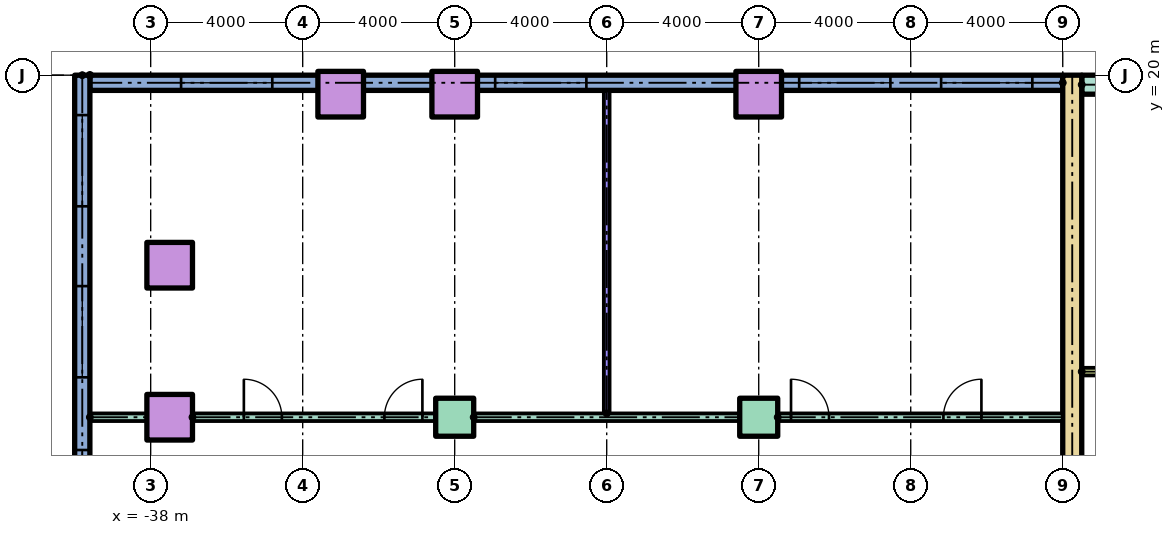
"""IFC4 building model, lengths in metres.
Left out: names, types, materials, properties, quantities, classifications, styles, units other than length and angle.
Written with IfcOpenShell. Run it as: python <this file> out.ifc"""

import sys

from ifc_helpers import new_model, si_unit, direction, frame, frame_2d, origin, origin_2d, place, context, subcontext, project, spatial, rectangle, hollow_rectangle, extrude, element, fill, save


model = new_model("IFC4")
c1 = context("Model", 3, precision=1e-05, world=origin(), true_north=direction((0.0, 1.0)))
c2 = subcontext(c1, "Body", "Model", "MODEL_VIEW")
j1 = project(units=[si_unit("LENGTHUNIT", "METRE"), si_unit("PLANEANGLEUNIT", "RADIAN")], contexts=[c1])
p1 = place(None, origin())
s1 = spatial("IfcSite", under=j1, at=p1, CompositionType="ELEMENT")
p2 = place(p1, origin())
s2 = spatial("IfcBuilding", under=s1, at=p2, CompositionType="ELEMENT")
p3 = place(p2, frame((0.0, 0.0, 22.0)))
s3 = spatial("IfcBuildingStorey", under=s2, at=p3, CompositionType="ELEMENT", Elevation=22.0)
p4 = place(p3, frame((-37.5, 11.0, 0.0)))
e1 = element("IfcColumn", 1, at=p4, inside=s3, PredefinedType="COLUMN", context=c2, shape_type="SweptSolid", body=[
    extrude(hollow_rectangle(XDim=1.2, YDim=1.2, WallThickness=0.06, at=origin_2d()), origin(), (0.0, 0.0, 1.0), 4.0),
])
for number, where in (
    (2, (-30.0, 11.0, 0.0)),
    (3, (-22.0, 11.0, 0.0)),
):
    element("IfcColumn", number, at=place(p3, frame(where)), inside=s3, PredefinedType="COLUMN", context=c2, shape_type="SweptSolid", body=[
        extrude(rectangle(XDim=1.0, YDim=1.0, at=origin_2d()), origin(), (0.0, 0.0, 1.0), 4.0),
    ])
for number, where in (
    (4, (-37.5, 15.0, 0.0)),
    (5, (-33.0, 19.5, 0.0)),
    (6, (-30.0, 19.5, 0.0)),
    (7, (-22.0, 19.5, 0.0)),
):
    element("IfcColumn", number, at=place(p3, frame(where)), inside=s3, PredefinedType="COLUMN", context=c2, shape_type="SweptSolid", body=[
        extrude(hollow_rectangle(XDim=1.2, YDim=1.2, WallThickness=0.06, at=origin_2d()), origin(), (0.0, 0.0, 1.0), 4.0),
    ])
p5 = place(p3, frame((-14.0, 19.8, 0.0), z_axis=(0.0, 0.0, 1.0), x_axis=(-1.0, 0.0, 0.0)))
e8 = element("IfcWall", 8, at=p5, inside=s3, PredefinedType="STANDARD", context=c2, shape_type="SweptSolid", body=[
    extrude(rectangle(XDim=25.6, YDim=0.4, at=frame_2d((12.8, 0.0))), origin(), (0.0, 0.0, 1.0), 3.7),
])
p6 = place(p5, frame((0.8, 0.0, 0.9)))
e9 = element("IfcOpeningElement", 9, at=p6, cuts=e8, PredefinedType="OPENING", context=c2, shape_type="SweptSolid", body=[
    extrude(rectangle(XDim=2.4, YDim=2.1, at=frame_2d((1.2, 1.05))), frame((0.0, 0.21, 0.0), z_axis=(0.0, -1.0, 0.0), x_axis=(1.0, 0.0, 0.0)), (0.0, 0.0, 1.0), 0.42),
])
p7 = place(p5, frame((4.535, 0.0, 0.9)))
e10 = element("IfcOpeningElement", 10, at=p7, cuts=e8, PredefinedType="OPENING", context=c2, shape_type="SweptSolid", body=[
    extrude(rectangle(XDim=2.4, YDim=2.1, at=frame_2d((1.2, 1.05))), frame((0.0, 0.21, 0.0), z_axis=(0.0, -1.0, 0.0), x_axis=(1.0, 0.0, 0.0)), (0.0, 0.0, 1.0), 0.42),
])
p8 = place(p5, frame((12.535, 0.0, 0.9)))
e11 = element("IfcOpeningElement", 11, at=p8, cuts=e8, PredefinedType="OPENING", context=c2, shape_type="SweptSolid", body=[
    extrude(rectangle(XDim=2.4, YDim=2.1, at=frame_2d((1.2, 1.05))), frame((0.0, 0.21, 0.0), z_axis=(0.0, -1.0, 0.0), x_axis=(1.0, 0.0, 0.0)), (0.0, 0.0, 1.0), 0.42),
])
p9 = place(p5, frame((20.8, 0.0, 0.9)))
e12 = element("IfcOpeningElement", 12, at=p9, cuts=e8, PredefinedType="OPENING", context=c2, shape_type="SweptSolid", body=[
    extrude(rectangle(XDim=2.4, YDim=2.1, at=frame_2d((1.2, 1.05))), frame((0.0, 0.21, 0.0), z_axis=(0.0, -1.0, 0.0), x_axis=(1.0, 0.0, 0.0)), (0.0, 0.0, 1.0), 0.42),
])
p10 = place(p3, frame((-39.8, 20.0, 0.0), z_axis=(0.0, 0.0, 1.0), x_axis=(0.0, -1.0, 0.0)))
e13 = element("IfcWall", 13, at=p10, inside=s3, PredefinedType="STANDARD", context=c2, shape_type="SweptSolid", body=[
    extrude(rectangle(XDim=70.0, YDim=0.4, at=frame_2d((35.0, 0.0))), origin(), (0.0, 0.0, 1.0), 3.7),
])
p11 = place(p10, frame((1.05, 0.0, 0.9)))
e14 = element("IfcOpeningElement", 14, at=p11, cuts=e13, PredefinedType="OPENING", context=c2, shape_type="SweptSolid", body=[
    extrude(rectangle(XDim=2.4, YDim=2.1, at=frame_2d((1.2, 1.05))), frame((0.0, 0.21, 0.0), z_axis=(0.0, -1.0, 0.0), x_axis=(1.0, 0.0, 0.0)), (0.0, 0.0, 1.0), 0.42),
])
p12 = place(p10, frame((5.55, 0.0, 0.9)))
e15 = element("IfcOpeningElement", 15, at=p12, cuts=e13, PredefinedType="OPENING", context=c2, shape_type="SweptSolid", body=[
    extrude(rectangle(XDim=2.4, YDim=2.1, at=frame_2d((1.2, 1.05))), frame((0.0, 0.21, 0.0), z_axis=(0.0, -1.0, 0.0), x_axis=(1.0, 0.0, 0.0)), (0.0, 0.0, 1.0), 0.42),
])
p13 = place(p10, frame((9.863, 0.0, 0.9)))
e16 = element("IfcOpeningElement", 16, at=p13, cuts=e13, PredefinedType="OPENING", context=c2, shape_type="SweptSolid", body=[
    extrude(rectangle(XDim=2.4, YDim=2.1, at=frame_2d((1.2, 1.05))), frame((0.0, 0.21, 0.0), z_axis=(0.0, -1.0, 0.0), x_axis=(1.0, 0.0, 0.0)), (0.0, 0.0, 1.0), 0.42),
])
p14 = place(p10, frame((13.988, 0.0, 0.9)))
e17 = element("IfcOpeningElement", 17, at=p14, cuts=e13, PredefinedType="OPENING", context=c2, shape_type="SweptSolid", body=[
    extrude(rectangle(XDim=2.4, YDim=2.1, at=frame_2d((1.2, 1.05))), frame((0.0, 0.21, 0.0), z_axis=(0.0, -1.0, 0.0), x_axis=(1.0, 0.0, 0.0)), (0.0, 0.0, 1.0), 0.42),
])
p15 = place(p10, frame((18.113, 0.0, 0.9)))
e18 = element("IfcOpeningElement", 18, at=p15, cuts=e13, PredefinedType="OPENING", context=c2, shape_type="SweptSolid", body=[
    extrude(rectangle(XDim=2.4, YDim=2.1, at=frame_2d((1.2, 1.05))), frame((0.0, 0.21, 0.0), z_axis=(0.0, -1.0, 0.0), x_axis=(1.0, 0.0, 0.0)), (0.0, 0.0, 1.0), 0.42),
])
p16 = place(p10, frame((22.238, 0.0, 0.9)))
e19 = element("IfcOpeningElement", 19, at=p16, cuts=e13, PredefinedType="OPENING", context=c2, shape_type="SweptSolid", body=[
    extrude(rectangle(XDim=2.4, YDim=2.1, at=frame_2d((1.2, 1.05))), frame((0.0, 0.21, 0.0), z_axis=(0.0, -1.0, 0.0), x_axis=(1.0, 0.0, 0.0)), (0.0, 0.0, 1.0), 0.42),
])
p17 = place(p10, frame((26.363, 0.0, 0.9)))
e20 = element("IfcOpeningElement", 20, at=p17, cuts=e13, PredefinedType="OPENING", context=c2, shape_type="SweptSolid", body=[
    extrude(rectangle(XDim=2.4, YDim=2.1, at=frame_2d((1.2, 1.05))), frame((0.0, 0.21, 0.0), z_axis=(0.0, -1.0, 0.0), x_axis=(1.0, 0.0, 0.0)), (0.0, 0.0, 1.0), 0.42),
])
p18 = place(p10, frame((30.488, 0.0, 0.9)))
e21 = element("IfcOpeningElement", 21, at=p18, cuts=e13, PredefinedType="OPENING", context=c2, shape_type="SweptSolid", body=[
    extrude(rectangle(XDim=2.4, YDim=2.1, at=frame_2d((1.2, 1.05))), frame((0.0, 0.21, 0.0), z_axis=(0.0, -1.0, 0.0), x_axis=(1.0, 0.0, 0.0)), (0.0, 0.0, 1.0), 0.42),
])
p19 = place(p10, frame((34.613, 0.0, 0.9)))
e22 = element("IfcOpeningElement", 22, at=p19, cuts=e13, PredefinedType="OPENING", context=c2, shape_type="SweptSolid", body=[
    extrude(rectangle(XDim=2.4, YDim=2.1, at=frame_2d((1.2, 1.05))), frame((0.0, 0.21, 0.0), z_axis=(0.0, -1.0, 0.0), x_axis=(1.0, 0.0, 0.0)), (0.0, 0.0, 1.0), 0.42),
])
p20 = place(p10, frame((38.738, 0.0, 0.9)))
e23 = element("IfcOpeningElement", 23, at=p20, cuts=e13, PredefinedType="OPENING", context=c2, shape_type="SweptSolid", body=[
    extrude(rectangle(XDim=2.4, YDim=2.1, at=frame_2d((1.2, 1.05))), frame((0.0, 0.21, 0.0), z_axis=(0.0, -1.0, 0.0), x_axis=(1.0, 0.0, 0.0)), (0.0, 0.0, 1.0), 0.42),
])
p21 = place(p10, frame((42.55, 0.0, 0.9)))
e24 = element("IfcOpeningElement", 24, at=p21, cuts=e13, PredefinedType="OPENING", context=c2, shape_type="SweptSolid", body=[
    extrude(rectangle(XDim=2.4, YDim=2.1, at=frame_2d((1.2, 1.05))), frame((0.0, 0.21, 0.0), z_axis=(0.0, -1.0, 0.0), x_axis=(1.0, 0.0, 0.0)), (0.0, 0.0, 1.0), 0.42),
])
p22 = place(p10, frame((46.05, 0.0, 0.9)))
e25 = element("IfcOpeningElement", 25, at=p22, cuts=e13, PredefinedType="OPENING", context=c2, shape_type="SweptSolid", body=[
    extrude(rectangle(XDim=2.4, YDim=2.1, at=frame_2d((1.2, 1.05))), frame((0.0, 0.21, 0.0), z_axis=(0.0, -1.0, 0.0), x_axis=(1.0, 0.0, 0.0)), (0.0, 0.0, 1.0), 0.42),
])
p23 = place(p10, frame((49.55, 0.0, 0.9)))
e26 = element("IfcOpeningElement", 26, at=p23, cuts=e13, PredefinedType="OPENING", context=c2, shape_type="SweptSolid", body=[
    extrude(rectangle(XDim=2.4, YDim=2.1, at=frame_2d((1.2, 1.05))), frame((0.0, 0.21, 0.0), z_axis=(0.0, -1.0, 0.0), x_axis=(1.0, 0.0, 0.0)), (0.0, 0.0, 1.0), 0.42),
])
p24 = place(p10, frame((53.217, 0.0, 0.9)))
e27 = element("IfcOpeningElement", 27, at=p24, cuts=e13, PredefinedType="OPENING", context=c2, shape_type="SweptSolid", body=[
    extrude(rectangle(XDim=2.4, YDim=2.1, at=frame_2d((1.2, 1.05))), frame((0.0, 0.21, 0.0), z_axis=(0.0, -1.0, 0.0), x_axis=(1.0, 0.0, 0.0)), (0.0, 0.0, 1.0), 0.42),
])
p25 = place(p10, frame((57.05, 0.0, 0.9)))
e28 = element("IfcOpeningElement", 28, at=p25, cuts=e13, PredefinedType="OPENING", context=c2, shape_type="SweptSolid", body=[
    extrude(rectangle(XDim=2.4, YDim=2.1, at=frame_2d((1.2, 1.05))), frame((0.0, 0.21, 0.0), z_axis=(0.0, -1.0, 0.0), x_axis=(1.0, 0.0, 0.0)), (0.0, 0.0, 1.0), 0.42),
])
p26 = place(p10, frame((60.883, 0.0, 0.9)))
e29 = element("IfcOpeningElement", 29, at=p26, cuts=e13, PredefinedType="OPENING", context=c2, shape_type="SweptSolid", body=[
    extrude(rectangle(XDim=2.4, YDim=2.1, at=frame_2d((1.2, 1.05))), frame((0.0, 0.21, 0.0), z_axis=(0.0, -1.0, 0.0), x_axis=(1.0, 0.0, 0.0)), (0.0, 0.0, 1.0), 0.42),
])
p27 = place(p10, frame((66.85, 0.0, 0.9)))
e30 = element("IfcOpeningElement", 30, at=p27, cuts=e13, PredefinedType="OPENING", context=c2, shape_type="SweptSolid", body=[
    extrude(rectangle(XDim=2.4, YDim=2.1, at=frame_2d((1.2, 1.05))), frame((0.0, 0.21, 0.0), z_axis=(0.0, -1.0, 0.0), x_axis=(1.0, 0.0, 0.0)), (0.0, 0.0, 1.0), 0.42),
])
p28 = place(p3, frame((-13.75, 3.0, 0.0), z_axis=(0.0, 0.0, 1.0), x_axis=(0.0, 1.0, 0.0)))
e31 = element("IfcWall", 31, at=p28, inside=s3, PredefinedType="SHEAR", context=c2, shape_type="SweptSolid", body=[
    extrude(rectangle(XDim=17.0, YDim=0.5, at=frame_2d((8.5, 0.0))), origin(), (0.0, 0.0, 1.0), 3.2),
])
p29 = place(p3, frame((-13.5, 19.75, 0.0)))
e32 = element("IfcWall", 32, at=p29, inside=s3, PredefinedType="SHEAR", context=c2, shape_type="SweptSolid", body=[
    extrude(rectangle(XDim=27.0, YDim=0.5, at=frame_2d((13.5, 0.0))), origin(), (0.0, 0.0, 1.0), 3.2),
])
p30 = place(p3, frame((-13.5, 12.2, 0.0)))
e33 = element("IfcWall", 33, at=p30, inside=s3, PredefinedType="PARTITIONING", context=c2, shape_type="SweptSolid", body=[
    extrude(rectangle(XDim=3.9, YDim=0.2, at=frame_2d((1.95, 0.0))), origin(), (0.0, 0.0, 1.0), 3.2),
])
p31 = place(p3, frame((-39.6, 11.0, 0.0)))
e34 = element("IfcWall", 34, at=p31, inside=s3, PredefinedType="PARTITIONING", context=c2, shape_type="SweptSolid", body=[
    extrude(rectangle(XDim=1.5, YDim=0.2, at=frame_2d((0.75, 0.0))), origin(), (0.0, 0.0, 1.0), 3.2),
])
p32 = place(p3, frame((-36.9, 11.0, 0.0)))
e35 = element("IfcWall", 35, at=p32, inside=s3, PredefinedType="PARTITIONING", context=c2, shape_type="SweptSolid", body=[
    extrude(rectangle(XDim=6.4, YDim=0.2, at=frame_2d((3.2, 0.0))), origin(), (0.0, 0.0, 1.0), 3.2),
])
p33 = place(p32, frame((1.352, 0.0, 0.0)))
e36 = element("IfcOpeningElement", 36, at=p33, cuts=e35, PredefinedType="OPENING", context=c2, shape_type="SweptSolid", body=[
    extrude(rectangle(XDim=1.0, YDim=2.1, at=frame_2d((0.5, 1.05))), frame((0.0, 0.11, 0.0), z_axis=(0.0, -1.0, 0.0), x_axis=(1.0, 0.0, 0.0)), (0.0, 0.0, 1.0), 0.22),
])
p34 = place(p32, frame((5.05, 0.0, 0.0)))
e37 = element("IfcOpeningElement", 37, at=p34, cuts=e35, PredefinedType="OPENING", context=c2, shape_type="SweptSolid", body=[
    extrude(rectangle(XDim=1.0, YDim=2.1, at=frame_2d((0.5, 1.05))), frame((0.0, 0.11, 0.0), z_axis=(0.0, -1.0, 0.0), x_axis=(1.0, 0.0, 0.0)), (0.0, 0.0, 1.0), 0.22),
])
p35 = place(p3, frame((-29.5, 11.0, 0.0)))
e38 = element("IfcWall", 38, at=p35, inside=s3, PredefinedType="PARTITIONING", context=c2, shape_type="SweptSolid", body=[
    extrude(rectangle(XDim=7.0, YDim=0.2, at=frame_2d((3.5, 0.0))), origin(), (0.0, 0.0, 1.0), 3.2),
])
p36 = place(p3, frame((-21.5, 11.0, 0.0)))
e39 = element("IfcWall", 39, at=p36, inside=s3, PredefinedType="PARTITIONING", context=c2, shape_type="SweptSolid", body=[
    extrude(rectangle(XDim=7.5, YDim=0.2, at=frame_2d((3.75, 0.0))), origin(), (0.0, 0.0, 1.0), 3.2),
])
p37 = place(p36, frame((0.35, 0.0, 0.0)))
e40 = element("IfcOpeningElement", 40, at=p37, cuts=e39, PredefinedType="OPENING", context=c2, shape_type="SweptSolid", body=[
    extrude(rectangle(XDim=1.0, YDim=2.1, at=frame_2d((0.5, 1.05))), frame((0.0, 0.11, 0.0), z_axis=(0.0, -1.0, 0.0), x_axis=(1.0, 0.0, 0.0)), (0.0, 0.0, 1.0), 0.22),
])
p38 = place(p36, frame((4.36, 0.0, 0.0)))
e41 = element("IfcOpeningElement", 41, at=p38, cuts=e39, PredefinedType="OPENING", context=c2, shape_type="SweptSolid", body=[
    extrude(rectangle(XDim=1.0, YDim=2.1, at=frame_2d((0.5, 1.05))), frame((0.0, 0.11, 0.0), z_axis=(0.0, -1.0, 0.0), x_axis=(1.0, 0.0, 0.0)), (0.0, 0.0, 1.0), 0.22),
])
p39 = place(p3, frame((-26.0, 11.1, 0.0), z_axis=(0.0, 0.0, 1.0), x_axis=(0.0, 1.0, 0.0)))
e42 = element("IfcWall", 42, at=p39, inside=s3, PredefinedType="PARTITIONING", context=c2, shape_type="SweptSolid", body=[
    extrude(rectangle(XDim=8.5, YDim=0.15, at=frame_2d((4.25, 0.0))), origin(), (0.0, 0.0, 1.0), 3.2),
])
p40 = place(p6, origin())
e43 = element("IfcWindow", 43, at=p40, inside=s3, PartitioningType="SINGLE_PANEL", PredefinedType="WINDOW", context=c2, shape_type="SweptSolid", body=[
    extrude(rectangle(XDim=2.4, YDim=2.1, at=frame_2d((1.2, 1.05))), frame((0.0, 0.03, 0.0), z_axis=(0.0, -1.0, 0.0), x_axis=(1.0, 0.0, 0.0)), (0.0, 0.0, 1.0), 0.06),
])
fill(e9, e43)
p41 = place(p7, origin())
e44 = element("IfcWindow", 44, at=p41, inside=s3, PartitioningType="SINGLE_PANEL", PredefinedType="WINDOW", context=c2, shape_type="SweptSolid", body=[
    extrude(rectangle(XDim=2.4, YDim=2.1, at=frame_2d((1.2, 1.05))), frame((0.0, 0.03, 0.0), z_axis=(0.0, -1.0, 0.0), x_axis=(1.0, 0.0, 0.0)), (0.0, 0.0, 1.0), 0.06),
])
fill(e10, e44)
p42 = place(p8, origin())
e45 = element("IfcWindow", 45, at=p42, inside=s3, PartitioningType="SINGLE_PANEL", PredefinedType="WINDOW", context=c2, shape_type="SweptSolid", body=[
    extrude(rectangle(XDim=2.4, YDim=2.1, at=frame_2d((1.2, 1.05))), frame((0.0, 0.03, 0.0), z_axis=(0.0, -1.0, 0.0), x_axis=(1.0, 0.0, 0.0)), (0.0, 0.0, 1.0), 0.06),
])
fill(e11, e45)
p43 = place(p9, origin())
e46 = element("IfcWindow", 46, at=p43, inside=s3, PartitioningType="SINGLE_PANEL", PredefinedType="WINDOW", context=c2, shape_type="SweptSolid", body=[
    extrude(rectangle(XDim=2.4, YDim=2.1, at=frame_2d((1.2, 1.05))), frame((0.0, 0.03, 0.0), z_axis=(0.0, -1.0, 0.0), x_axis=(1.0, 0.0, 0.0)), (0.0, 0.0, 1.0), 0.06),
])
fill(e12, e46)
p44 = place(p11, origin())
e47 = element("IfcWindow", 47, at=p44, inside=s3, PartitioningType="SINGLE_PANEL", PredefinedType="WINDOW", context=c2, shape_type="SweptSolid", body=[
    extrude(rectangle(XDim=2.4, YDim=2.1, at=frame_2d((1.2, 1.05))), frame((0.0, 0.03, 0.0), z_axis=(0.0, -1.0, 0.0), x_axis=(1.0, 0.0, 0.0)), (0.0, 0.0, 1.0), 0.06),
])
fill(e14, e47)
p45 = place(p12, origin())
e48 = element("IfcWindow", 48, at=p45, inside=s3, PartitioningType="SINGLE_PANEL", PredefinedType="WINDOW", context=c2, shape_type="SweptSolid", body=[
    extrude(rectangle(XDim=2.4, YDim=2.1, at=frame_2d((1.2, 1.05))), frame((0.0, 0.03, 0.0), z_axis=(0.0, -1.0, 0.0), x_axis=(1.0, 0.0, 0.0)), (0.0, 0.0, 1.0), 0.06),
])
fill(e15, e48)
p46 = place(p13, origin())
e49 = element("IfcWindow", 49, at=p46, inside=s3, PartitioningType="SINGLE_PANEL", PredefinedType="WINDOW", context=c2, shape_type="SweptSolid", body=[
    extrude(rectangle(XDim=2.4, YDim=2.1, at=frame_2d((1.2, 1.05))), frame((0.0, 0.03, 0.0), z_axis=(0.0, -1.0, 0.0), x_axis=(1.0, 0.0, 0.0)), (0.0, 0.0, 1.0), 0.06),
])
fill(e16, e49)
p47 = place(p33, origin())
e50 = element("IfcDoor", 50, at=p47, inside=s3, OperationType="SINGLE_SWING_LEFT", PredefinedType="DOOR", context=c2, shape_type="SweptSolid", body=[
    extrude(rectangle(XDim=1.0, YDim=2.1, at=frame_2d((0.5, 1.05))), frame((0.0, 0.025, 0.0), z_axis=(0.0, -1.0, 0.0), x_axis=(1.0, 0.0, 0.0)), (0.0, 0.0, 1.0), 0.05),
])
fill(e36, e50)
p48 = place(p34, origin())
e51 = element("IfcDoor", 51, at=p48, inside=s3, OperationType="SINGLE_SWING_RIGHT", PredefinedType="DOOR", context=c2, shape_type="SweptSolid", body=[
    extrude(rectangle(XDim=1.0, YDim=2.1, at=frame_2d((0.5, 1.05))), frame((0.0, 0.025, 0.0), z_axis=(0.0, -1.0, 0.0), x_axis=(1.0, 0.0, 0.0)), (0.0, 0.0, 1.0), 0.05),
])
fill(e37, e51)
p49 = place(p37, origin())
e52 = element("IfcDoor", 52, at=p49, inside=s3, OperationType="SINGLE_SWING_LEFT", PredefinedType="DOOR", context=c2, shape_type="SweptSolid", body=[
    extrude(rectangle(XDim=1.0, YDim=2.1, at=frame_2d((0.5, 1.05))), frame((0.0, 0.025, 0.0), z_axis=(0.0, -1.0, 0.0), x_axis=(1.0, 0.0, 0.0)), (0.0, 0.0, 1.0), 0.05),
])
fill(e40, e52)
p50 = place(p38, origin())
e53 = element("IfcDoor", 53, at=p50, inside=s3, OperationType="SINGLE_SWING_RIGHT", PredefinedType="DOOR", context=c2, shape_type="SweptSolid", body=[
    extrude(rectangle(XDim=1.0, YDim=2.1, at=frame_2d((0.5, 1.05))), frame((0.0, 0.025, 0.0), z_axis=(0.0, -1.0, 0.0), x_axis=(1.0, 0.0, 0.0)), (0.0, 0.0, 1.0), 0.05),
])
fill(e41, e53)
save(model, sys.argv[1])
